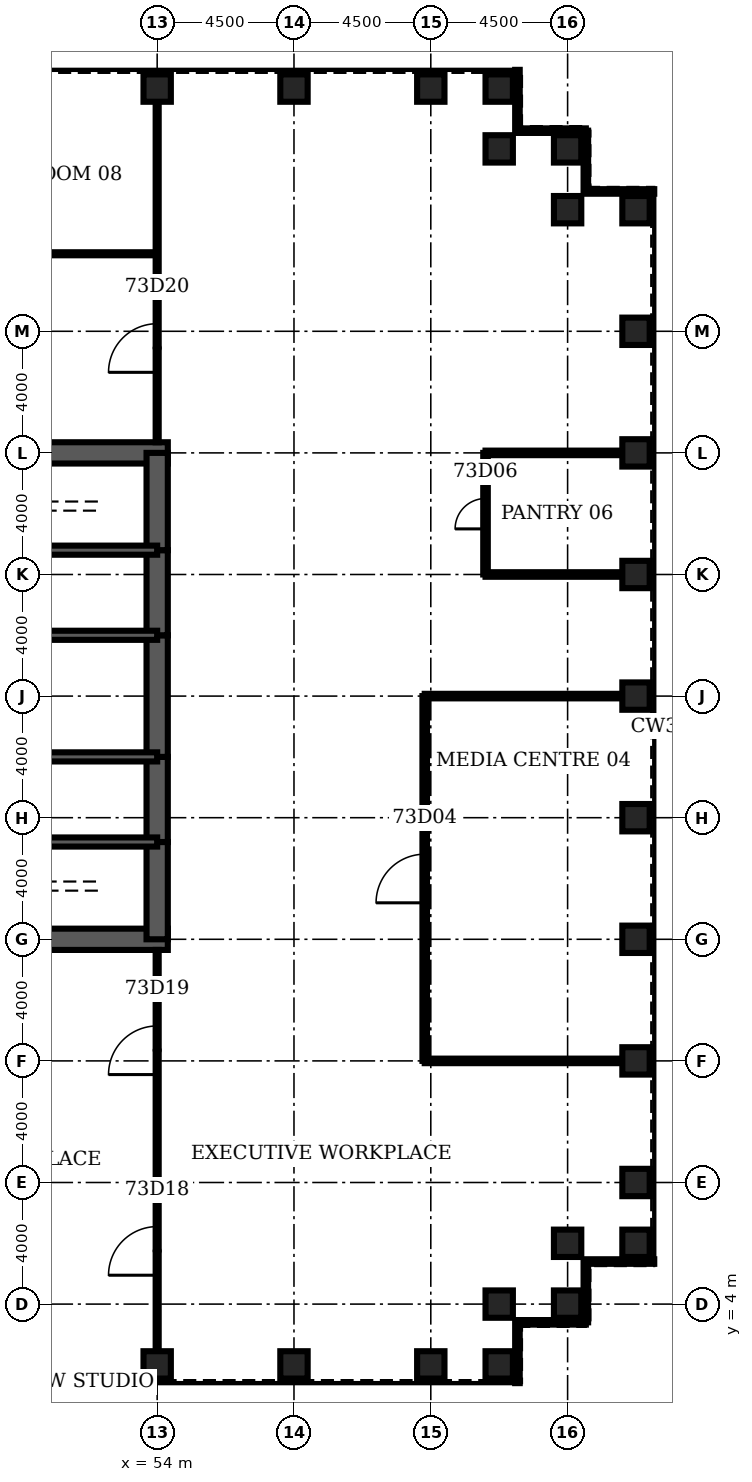
"""IFC4 building model, lengths in metres.
Left out: names, types, materials, properties, quantities, classifications, styles, units other than length and angle.
Written with IfcOpenShell. Run it as: python <this file> out.ifc"""

import sys

from ifc_helpers import new_model, si_unit, direction, frame, frame_2d, origin, origin_2d, place, context, subcontext, project, spatial, rectangle, hollow_rectangle, extrude, element, fill, save


model = new_model("IFC4")
c1 = context("Model", 3, precision=1e-05, world=origin(), true_north=direction((0.0, 1.0)))
c2 = subcontext(c1, "Body", "Model", "MODEL_VIEW")
j1 = project(units=[si_unit("LENGTHUNIT", "METRE"), si_unit("PLANEANGLEUNIT", "RADIAN")], contexts=[c1])
p1 = place(None, origin())
s1 = spatial("IfcSite", under=j1, at=p1, CompositionType="ELEMENT")
p2 = place(p1, origin())
s2 = spatial("IfcBuilding", under=s1, at=p2, CompositionType="ELEMENT")
p3 = place(p2, frame((0.0, 0.0, 321.5)))
s3 = spatial("IfcBuildingStorey", under=s2, at=p3, CompositionType="ELEMENT", Elevation=321.5)
for number, where, z_axis, x_axis in (
    (1, (54.0, 2.0, 0.0), (0.0, 0.0, 1.0), (0.0, 1.0, 0.0)),
    (2, (58.5, 2.0, 0.0), (0.0, 0.0, 1.0), (0.0, 1.0, 0.0)),
    (3, (63.0, 2.0, 0.0), (0.0, 0.0, 1.0), (0.0, 1.0, 0.0)),
    (4, (65.25, 2.0, 0.0), (0.0, 0.0, 1.0), (0.0, 1.0, 0.0)),
    (5, (65.25, 4.0, 0.0), (0.0, 0.0, 1.0), (0.0, 1.0, 0.0)),
    (6, (67.5, 4.0, 0.0), (0.0, 0.0, 1.0), (1.0, 0.0, 0.0)),
    (7, (67.5, 6.0, 0.0), (0.0, 0.0, 1.0), (1.0, 0.0, 0.0)),
    (8, (69.75, 6.0, 0.0), (0.0, 0.0, 1.0), (1.0, 0.0, 0.0)),
    (9, (69.75, 8.0, 0.0), (0.0, 0.0, 1.0), (1.0, 0.0, 0.0)),
    (10, (69.75, 12.0, 0.0), (0.0, 0.0, 1.0), (1.0, 0.0, 0.0)),
    (11, (69.75, 16.0, 0.0), (0.0, 0.0, 1.0), (1.0, 0.0, 0.0)),
    (12, (69.75, 20.0, 0.0), (0.0, 0.0, 1.0), (1.0, 0.0, 0.0)),
    (13, (69.75, 24.0, 0.0), (0.0, 0.0, 1.0), (1.0, 0.0, 0.0)),
    (14, (69.75, 28.0, 0.0), (0.0, 0.0, 1.0), (1.0, 0.0, 0.0)),
    (15, (69.75, 32.0, 0.0), (0.0, 0.0, 1.0), (1.0, 0.0, 0.0)),
    (16, (69.75, 36.0, 0.0), (0.0, 0.0, 1.0), (1.0, 0.0, 0.0)),
    (17, (69.75, 40.0, 0.0), (0.0, 0.0, 1.0), (1.0, 0.0, 0.0)),
    (18, (67.5, 40.0, 0.0), (0.0, 0.0, 1.0), (1.0, 0.0, 0.0)),
    (19, (67.5, 42.0, 0.0), (0.0, 0.0, 1.0), (1.0, 0.0, 0.0)),
    (20, (65.25, 42.0, 0.0), (0.0, 0.0, 1.0), (0.0, 1.0, 0.0)),
    (21, (65.25, 44.0, 0.0), (0.0, 0.0, 1.0), (0.0, 1.0, 0.0)),
    (22, (63.0, 44.0, 0.0), (0.0, 0.0, 1.0), (0.0, 1.0, 0.0)),
    (23, (58.5, 44.0, 0.0), (0.0, 0.0, 1.0), (0.0, 1.0, 0.0)),
    (24, (54.0, 44.0, 0.0), (0.0, 0.0, 1.0), (0.0, 1.0, 0.0)),
):
    element("IfcColumn", number, at=place(p3, frame(where, z_axis=z_axis, x_axis=x_axis)), inside=s3, PredefinedType="COLUMN", context=c2, shape_type="SweptSolid", body=[
        extrude(hollow_rectangle(XDim=0.9, YDim=0.9, WallThickness=0.05, at=origin_2d()), origin(), (0.0, 0.0, 1.0), 4.2),
    ])
for number, where, z_axis, x_axis in (
    (25, (45.0, 16.0, 0.0), (0.0, 0.0, 1.0), (1.0, 0.0, 0.0)),
    (26, (54.35, 32.0, 0.0), (0.0, 0.0, 1.0), (-1.0, 0.0, 0.0)),
):
    element("IfcWall", number, at=place(p3, frame(where, z_axis=z_axis, x_axis=x_axis)), inside=s3, PredefinedType="SHEAR", context=c2, shape_type="SweptSolid", body=[
        extrude(rectangle(XDim=9.35, YDim=0.7, at=frame_2d((4.675, 0.0))), origin(), (0.0, 0.0, 1.0), 4.2),
    ])
p4 = place(p3, frame((54.0, 16.0, 0.0), z_axis=(0.0, 0.0, 1.0), x_axis=(0.0, 1.0, 0.0)))
e27 = element("IfcWall", 27, at=p4, inside=s3, PredefinedType="SHEAR", context=c2, shape_type="SweptSolid", body=[
    extrude(rectangle(XDim=3.2, YDim=0.7, at=frame_2d((1.6, 0.0))), origin(), (0.0, 0.0, 1.0), 4.2),
])
p5 = place(p3, frame((54.0, 19.2, 0.0), z_axis=(0.0, 0.0, 1.0), x_axis=(0.0, 1.0, 0.0)))
e28 = element("IfcWall", 28, at=p5, inside=s3, PredefinedType="SHEAR", context=c2, shape_type="SweptSolid", body=[
    extrude(rectangle(XDim=2.8, YDim=0.7, at=frame_2d((1.4, 0.0))), origin(), (0.0, 0.0, 1.0), 4.2),
])
p6 = place(p5, frame((0.4, 0.0, 0.0)))
e29 = element("IfcOpeningElement", 29, at=p6, cuts=e28, PredefinedType="OPENING", context=c2, shape_type="SweptSolid", body=[
    extrude(rectangle(XDim=1.8, YDim=2.1, at=frame_2d((0.9, 1.05))), frame((0.0, 0.36, 0.0), z_axis=(0.0, -1.0, 0.0), x_axis=(1.0, 0.0, 0.0)), (0.0, 0.0, 1.0), 0.72),
])
p7 = place(p3, frame((54.0, 22.0, 0.0), z_axis=(0.0, 0.0, 1.0), x_axis=(0.0, 1.0, 0.0)))
e30 = element("IfcWall", 30, at=p7, inside=s3, PredefinedType="SHEAR", context=c2, shape_type="SweptSolid", body=[
    extrude(rectangle(XDim=4.0, YDim=0.7, at=frame_2d((2.0, 0.0))), origin(), (0.0, 0.0, 1.0), 4.2),
])
p8 = place(p3, frame((54.0, 26.0, 0.0), z_axis=(0.0, 0.0, 1.0), x_axis=(0.0, 1.0, 0.0)))
e31 = element("IfcWall", 31, at=p8, inside=s3, PredefinedType="SHEAR", context=c2, shape_type="SweptSolid", body=[
    extrude(rectangle(XDim=2.8, YDim=0.7, at=frame_2d((1.4, 0.0))), origin(), (0.0, 0.0, 1.0), 4.2),
])
p9 = place(p8, frame((0.6, 0.0, 0.0)))
e32 = element("IfcOpeningElement", 32, at=p9, cuts=e31, PredefinedType="OPENING", context=c2, shape_type="SweptSolid", body=[
    extrude(rectangle(XDim=1.8, YDim=2.1, at=frame_2d((0.9, 1.05))), frame((0.0, 0.36, 0.0), z_axis=(0.0, -1.0, 0.0), x_axis=(1.0, 0.0, 0.0)), (0.0, 0.0, 1.0), 0.72),
])
p10 = place(p3, frame((54.0, 28.8, 0.0), z_axis=(0.0, 0.0, 1.0), x_axis=(0.0, 1.0, 0.0)))
e33 = element("IfcWall", 33, at=p10, inside=s3, PredefinedType="SHEAR", context=c2, shape_type="SweptSolid", body=[
    extrude(rectangle(XDim=3.2, YDim=0.7, at=frame_2d((1.6, 0.0))), origin(), (0.0, 0.0, 1.0), 4.2),
])
p11 = place(p3, frame((45.0, 19.2, 0.0), z_axis=(0.0, 0.0, 1.0), x_axis=(1.0, 0.0, 0.0)))
e34 = element("IfcWall", 34, at=p11, inside=s3, PredefinedType="SOLIDWALL", context=c2, shape_type="SweptSolid", body=[
    extrude(rectangle(XDim=9.0, YDim=0.3, at=frame_2d((4.5, 0.0))), origin(), (0.0, 0.0, 1.0), 4.2),
])
p12 = place(p11, frame((7.35, 0.0, 0.0)))
e35 = element("IfcOpeningElement", 35, at=p12, cuts=e34, PredefinedType="OPENING", context=c2, shape_type="SweptSolid", body=[
    extrude(rectangle(XDim=1.0, YDim=2.1, at=frame_2d((0.5, 1.05))), frame((0.0, 0.16, 0.0), z_axis=(0.0, -1.0, 0.0), x_axis=(1.0, 0.0, 0.0)), (0.0, 0.0, 1.0), 0.32),
])
p13 = place(p3, frame((45.0, 28.8, 0.0), z_axis=(0.0, 0.0, 1.0), x_axis=(1.0, 0.0, 0.0)))
e36 = element("IfcWall", 36, at=p13, inside=s3, PredefinedType="SOLIDWALL", context=c2, shape_type="SweptSolid", body=[
    extrude(rectangle(XDim=9.0, YDim=0.3, at=frame_2d((4.5, 0.0))), origin(), (0.0, 0.0, 1.0), 4.2),
])
p14 = place(p13, frame((7.35, 0.0, 0.0)))
e37 = element("IfcOpeningElement", 37, at=p14, cuts=e36, PredefinedType="OPENING", context=c2, shape_type="SweptSolid", body=[
    extrude(rectangle(XDim=1.0, YDim=2.1, at=frame_2d((0.5, 1.05))), frame((0.0, 0.16, 0.0), z_axis=(0.0, -1.0, 0.0), x_axis=(1.0, 0.0, 0.0)), (0.0, 0.0, 1.0), 0.32),
])
p15 = place(p3, frame((48.0, 22.0, 0.0), z_axis=(0.0, 0.0, 1.0), x_axis=(1.0, 0.0, 0.0)))
e38 = element("IfcWall", 38, at=p15, inside=s3, PredefinedType="SOLIDWALL", context=c2, shape_type="SweptSolid", body=[
    extrude(rectangle(XDim=6.0, YDim=0.3, at=frame_2d((3.0, 0.0))), origin(), (0.0, 0.0, 1.0), 4.2),
])
p16 = place(p15, frame((2.0, 0.0, 0.0)))
e39 = element("IfcOpeningElement", 39, at=p16, cuts=e38, PredefinedType="OPENING", context=c2, shape_type="SweptSolid", body=[
    extrude(rectangle(XDim=1.0, YDim=2.1, at=frame_2d((0.5, 1.05))), frame((0.0, 0.16, 0.0), z_axis=(0.0, -1.0, 0.0), x_axis=(1.0, 0.0, 0.0)), (0.0, 0.0, 1.0), 0.32),
])
p17 = place(p15, frame((4.1, 0.0, 0.0)))
e40 = element("IfcOpeningElement", 40, at=p17, cuts=e38, PredefinedType="OPENING", context=c2, shape_type="SweptSolid", body=[
    extrude(rectangle(XDim=1.0, YDim=2.1, at=frame_2d((0.5, 1.05))), frame((0.0, 0.16, 0.0), z_axis=(0.0, -1.0, 0.0), x_axis=(1.0, 0.0, 0.0)), (0.0, 0.0, 1.0), 0.32),
])
p18 = place(p3, frame((48.0, 26.0, 0.0), z_axis=(0.0, 0.0, 1.0), x_axis=(1.0, 0.0, 0.0)))
e41 = element("IfcWall", 41, at=p18, inside=s3, PredefinedType="SOLIDWALL", context=c2, shape_type="SweptSolid", body=[
    extrude(rectangle(XDim=6.0, YDim=0.3, at=frame_2d((3.0, 0.0))), origin(), (0.0, 0.0, 1.0), 4.2),
])
p19 = place(p3, frame((51.475, 22.15, 0.0), z_axis=(0.0, 0.0, 1.0), x_axis=(0.0, 1.0, 0.0)))
e42 = element("IfcWall", 42, at=p19, inside=s3, PredefinedType="PARTITIONING", context=c2, shape_type="SweptSolid", body=[
    extrude(rectangle(XDim=3.7, YDim=0.15, at=frame_2d((1.85, 0.0))), origin(), (0.0, 0.0, 1.0), 3.0),
])
for number, where, z_axis, x_axis in (
    (43, (62.8, 12.0, 0.0), (0.0, 0.0, 1.0), (1.0, 0.0, 0.0)),
    (44, (62.8, 24.0, 0.0), (0.0, 0.0, 1.0), (1.0, 0.0, 0.0)),
):
    element("IfcWall", number, at=place(p3, frame(where, z_axis=z_axis, x_axis=x_axis)), inside=s3, PredefinedType="PARTITIONING", context=c2, shape_type="SweptSolid", body=[
        extrude(rectangle(XDim=6.5, YDim=0.15, at=frame_2d((3.25, 0.0))), origin(), (0.0, 0.0, 1.0), 3.0),
    ])
for number, where, z_axis, x_axis in (
    (45, (64.8, 28.0, 0.0), (0.0, 0.0, 1.0), (1.0, 0.0, 0.0)),
    (46, (64.8, 32.0, 0.0), (0.0, 0.0, 1.0), (1.0, 0.0, 0.0)),
):
    element("IfcWall", number, at=place(p3, frame(where, z_axis=z_axis, x_axis=x_axis)), inside=s3, PredefinedType="PARTITIONING", context=c2, shape_type="SweptSolid", body=[
        extrude(rectangle(XDim=4.5, YDim=0.15, at=frame_2d((2.25, 0.0))), origin(), (0.0, 0.0, 1.0), 3.0),
    ])
p20 = place(p3, frame((36.0, 38.55, 0.0), z_axis=(0.0, 0.0, 1.0), x_axis=(1.0, 0.0, 0.0)))
e47 = element("IfcWall", 47, at=p20, inside=s3, PredefinedType="PARTITIONING", context=c2, shape_type="SweptSolid", body=[
    extrude(rectangle(XDim=18.0, YDim=0.1, at=frame_2d((9.0, 0.0))), origin(), (0.0, 0.0, 1.0), 3.0),
])
p21 = place(p20, frame((4.0, 0.0, 0.0)))
e48 = element("IfcOpeningElement", 48, at=p21, cuts=e47, PredefinedType="OPENING", context=c2, shape_type="SweptSolid", body=[
    extrude(rectangle(XDim=1.0, YDim=2.1, at=frame_2d((0.5, 1.05))), frame((0.0, 0.06, 0.0), z_axis=(0.0, -1.0, 0.0), x_axis=(1.0, 0.0, 0.0)), (0.0, 0.0, 1.0), 0.12),
])
p22 = place(p20, frame((13.0, 0.0, 0.0)))
e49 = element("IfcOpeningElement", 49, at=p22, cuts=e47, PredefinedType="OPENING", context=c2, shape_type="SweptSolid", body=[
    extrude(rectangle(XDim=1.0, YDim=2.1, at=frame_2d((0.5, 1.05))), frame((0.0, 0.06, 0.0), z_axis=(0.0, -1.0, 0.0), x_axis=(1.0, 0.0, 0.0)), (0.0, 0.0, 1.0), 0.12),
])
p23 = place(p3, frame((54.0, 2.45, 0.0), z_axis=(0.0, 0.0, 1.0), x_axis=(0.0, 1.0, 0.0)))
e50 = element("IfcWall", 50, at=p23, inside=s3, PredefinedType="PARTITIONING", context=c2, shape_type="SweptSolid", body=[
    extrude(rectangle(XDim=13.2, YDim=0.1, at=frame_2d((6.6, 0.0))), origin(), (0.0, 0.0, 1.0), 3.0),
])
p24 = place(p23, frame((2.5, 0.0, 0.0)))
e51 = element("IfcOpeningElement", 51, at=p24, cuts=e50, PredefinedType="OPENING", context=c2, shape_type="SweptSolid", body=[
    extrude(rectangle(XDim=1.6, YDim=2.1, at=frame_2d((0.8, 1.05))), frame((0.0, 0.06, 0.0), z_axis=(0.0, -1.0, 0.0), x_axis=(1.0, 0.0, 0.0)), (0.0, 0.0, 1.0), 0.12),
])
p25 = place(p23, frame((9.1, 0.0, 0.0)))
e52 = element("IfcOpeningElement", 52, at=p25, cuts=e50, PredefinedType="OPENING", context=c2, shape_type="SweptSolid", body=[
    extrude(rectangle(XDim=1.6, YDim=2.1, at=frame_2d((0.8, 1.05))), frame((0.0, 0.06, 0.0), z_axis=(0.0, -1.0, 0.0), x_axis=(1.0, 0.0, 0.0)), (0.0, 0.0, 1.0), 0.12),
])
p26 = place(p3, frame((54.0, 32.35, 0.0), z_axis=(0.0, 0.0, 1.0), x_axis=(0.0, 1.0, 0.0)))
e53 = element("IfcWall", 53, at=p26, inside=s3, PredefinedType="PARTITIONING", context=c2, shape_type="SweptSolid", body=[
    extrude(rectangle(XDim=11.2, YDim=0.1, at=frame_2d((5.6, 0.0))), origin(), (0.0, 0.0, 1.0), 3.0),
])
p27 = place(p26, frame((2.3, 0.0, 0.0)))
e54 = element("IfcOpeningElement", 54, at=p27, cuts=e53, PredefinedType="OPENING", context=c2, shape_type="SweptSolid", body=[
    extrude(rectangle(XDim=1.6, YDim=2.1, at=frame_2d((0.8, 1.05))), frame((0.0, 0.06, 0.0), z_axis=(0.0, -1.0, 0.0), x_axis=(1.0, 0.0, 0.0)), (0.0, 0.0, 1.0), 0.12),
])
p28 = place(p3, frame((62.8, 12.0, 0.0), z_axis=(0.0, 0.0, 1.0), x_axis=(0.0, 1.0, 0.0)))
e55 = element("IfcWall", 55, at=p28, inside=s3, PredefinedType="PARTITIONING", context=c2, shape_type="SweptSolid", body=[
    extrude(rectangle(XDim=12.0, YDim=0.15, at=frame_2d((6.0, 0.0))), origin(), (0.0, 0.0, 1.0), 3.0),
])
p29 = place(p28, frame((5.2, 0.0, 0.0)))
e56 = element("IfcOpeningElement", 56, at=p29, cuts=e55, PredefinedType="OPENING", context=c2, shape_type="SweptSolid", body=[
    extrude(rectangle(XDim=1.6, YDim=2.1, at=frame_2d((0.8, 1.05))), frame((0.0, 0.085, 0.0), z_axis=(0.0, -1.0, 0.0), x_axis=(1.0, 0.0, 0.0)), (0.0, 0.0, 1.0), 0.17),
])
p30 = place(p3, frame((64.8, 28.0, 0.0), z_axis=(0.0, 0.0, 1.0), x_axis=(0.0, 1.0, 0.0)))
e57 = element("IfcWall", 57, at=p30, inside=s3, PredefinedType="PARTITIONING", context=c2, shape_type="SweptSolid", body=[
    extrude(rectangle(XDim=4.0, YDim=0.15, at=frame_2d((2.0, 0.0))), origin(), (0.0, 0.0, 1.0), 3.0),
])
p31 = place(p30, frame((1.5, 0.0, 0.0)))
e58 = element("IfcOpeningElement", 58, at=p31, cuts=e57, PredefinedType="OPENING", context=c2, shape_type="SweptSolid", body=[
    extrude(rectangle(XDim=1.0, YDim=2.1, at=frame_2d((0.5, 1.05))), frame((0.0, 0.085, 0.0), z_axis=(0.0, -1.0, 0.0), x_axis=(1.0, 0.0, 0.0)), (0.0, 0.0, 1.0), 0.17),
])
p32 = place(p3, frame((65.85, 1.4, 0.0), z_axis=(0.0, 0.0, 1.0), x_axis=(0.0, 1.0, 0.0)))
e59 = element("IfcWall", 59, at=p32, inside=s3, PredefinedType="ELEMENTEDWALL", context=c2, shape_type="SweptSolid", body=[
    extrude(rectangle(XDim=2.0, YDim=0.15, at=frame_2d((1.0, 0.0))), origin(), (0.0, 0.0, 1.0), 4.04),
])
p33 = place(p3, frame((65.85, 3.4, 0.0), z_axis=(0.0, 0.0, 1.0), x_axis=(1.0, 0.0, 0.0)))
e60 = element("IfcWall", 60, at=p33, inside=s3, PredefinedType="ELEMENTEDWALL", context=c2, shape_type="SweptSolid", body=[
    extrude(rectangle(XDim=2.25, YDim=0.15, at=frame_2d((1.125, 0.0))), origin(), (0.0, 0.0, 1.0), 4.04),
])
p34 = place(p3, frame((68.1, 3.4, 0.0), z_axis=(0.0, 0.0, 1.0), x_axis=(0.0, 1.0, 0.0)))
e61 = element("IfcWall", 61, at=p34, inside=s3, PredefinedType="ELEMENTEDWALL", context=c2, shape_type="SweptSolid", body=[
    extrude(rectangle(XDim=2.0, YDim=0.15, at=frame_2d((1.0, 0.0))), origin(), (0.0, 0.0, 1.0), 4.04),
])
for number, where, z_axis, x_axis in (
    (62, (68.1, 5.4, 0.0), (0.0, 0.0, 1.0), (1.0, 0.0, 0.0)),
    (63, (70.35, 40.6, 0.0), (0.0, 0.0, 1.0), (-1.0, 0.0, 0.0)),
):
    element("IfcWall", number, at=place(p3, frame(where, z_axis=z_axis, x_axis=x_axis)), inside=s3, PredefinedType="ELEMENTEDWALL", context=c2, shape_type="SweptSolid", body=[
        extrude(rectangle(XDim=2.25, YDim=0.15, at=frame_2d((1.125, 0.0))), origin(), (0.0, 0.0, 1.0), 4.04),
    ])
p35 = place(p3, frame((68.1, 40.6, 0.0), z_axis=(0.0, 0.0, 1.0), x_axis=(0.0, 1.0, 0.0)))
e64 = element("IfcWall", 64, at=p35, inside=s3, PredefinedType="ELEMENTEDWALL", context=c2, shape_type="SweptSolid", body=[
    extrude(rectangle(XDim=2.0, YDim=0.15, at=frame_2d((1.0, 0.0))), origin(), (0.0, 0.0, 1.0), 4.04),
])
p36 = place(p3, frame((68.1, 42.6, 0.0), z_axis=(0.0, 0.0, 1.0), x_axis=(-1.0, 0.0, 0.0)))
e65 = element("IfcWall", 65, at=p36, inside=s3, PredefinedType="ELEMENTEDWALL", context=c2, shape_type="SweptSolid", body=[
    extrude(rectangle(XDim=2.25, YDim=0.15, at=frame_2d((1.125, 0.0))), origin(), (0.0, 0.0, 1.0), 4.04),
])
p37 = place(p3, frame((65.85, 42.6, 0.0), z_axis=(0.0, 0.0, 1.0), x_axis=(0.0, 1.0, 0.0)))
e66 = element("IfcWall", 66, at=p37, inside=s3, PredefinedType="ELEMENTEDWALL", context=c2, shape_type="SweptSolid", body=[
    extrude(rectangle(XDim=2.0, YDim=0.15, at=frame_2d((1.0, 0.0))), origin(), (0.0, 0.0, 1.0), 4.04),
])
p38 = place(p29, origin())
e67 = element("IfcDoor", 67, at=p38, inside=s3, OperationType="SINGLE_SWING_LEFT", PredefinedType="DOOR", context=c2, shape_type="SweptSolid", body=[
    extrude(rectangle(XDim=1.6, YDim=2.1, at=frame_2d((0.8, 1.05))), frame((0.0, 0.025, 0.0), z_axis=(0.0, -1.0, 0.0), x_axis=(1.0, 0.0, 0.0)), (0.0, 0.0, 1.0), 0.05),
])
fill(e56, e67)
p39 = place(p31, origin())
e68 = element("IfcDoor", 68, at=p39, inside=s3, OperationType="SINGLE_SWING_LEFT", PredefinedType="DOOR", context=c2, shape_type="SweptSolid", body=[
    extrude(rectangle(XDim=1.0, YDim=2.1, at=frame_2d((0.5, 1.05))), frame((0.0, 0.025, 0.0), z_axis=(0.0, -1.0, 0.0), x_axis=(1.0, 0.0, 0.0)), (0.0, 0.0, 1.0), 0.05),
])
fill(e58, e68)
p40 = place(p24, origin())
e69 = element("IfcDoor", 69, at=p40, inside=s3, OperationType="SINGLE_SWING_LEFT", PredefinedType="DOOR", context=c2, shape_type="SweptSolid", body=[
    extrude(rectangle(XDim=1.6, YDim=2.1, at=frame_2d((0.8, 1.05))), frame((0.0, 0.025, 0.0), z_axis=(0.0, -1.0, 0.0), x_axis=(1.0, 0.0, 0.0)), (0.0, 0.0, 1.0), 0.05),
])
fill(e51, e69)
p41 = place(p25, origin())
e70 = element("IfcDoor", 70, at=p41, inside=s3, OperationType="SINGLE_SWING_LEFT", PredefinedType="DOOR", context=c2, shape_type="SweptSolid", body=[
    extrude(rectangle(XDim=1.6, YDim=2.1, at=frame_2d((0.8, 1.05))), frame((0.0, 0.025, 0.0), z_axis=(0.0, -1.0, 0.0), x_axis=(1.0, 0.0, 0.0)), (0.0, 0.0, 1.0), 0.05),
])
fill(e52, e70)
p42 = place(p27, origin())
e71 = element("IfcDoor", 71, at=p42, inside=s3, OperationType="SINGLE_SWING_LEFT", PredefinedType="DOOR", context=c2, shape_type="SweptSolid", body=[
    extrude(rectangle(XDim=1.6, YDim=2.1, at=frame_2d((0.8, 1.05))), frame((0.0, 0.025, 0.0), z_axis=(0.0, -1.0, 0.0), x_axis=(1.0, 0.0, 0.0)), (0.0, 0.0, 1.0), 0.05),
])
fill(e54, e71)
p43 = place(p12, origin())
e72 = element("IfcDoor", 72, at=p43, inside=s3, OperationType="SINGLE_SWING_RIGHT", PredefinedType="DOOR", context=c2, shape_type="SweptSolid", body=[
    extrude(rectangle(XDim=1.0, YDim=2.1, at=frame_2d((0.5, 1.05))), frame((0.0, 0.025, 0.0), z_axis=(0.0, -1.0, 0.0), x_axis=(1.0, 0.0, 0.0)), (0.0, 0.0, 1.0), 0.05),
])
fill(e35, e72)
p44 = place(p14, origin())
e73 = element("IfcDoor", 73, at=p44, inside=s3, OperationType="SINGLE_SWING_RIGHT", PredefinedType="DOOR", context=c2, shape_type="SweptSolid", body=[
    extrude(rectangle(XDim=1.0, YDim=2.1, at=frame_2d((0.5, 1.05))), frame((0.0, 0.025, 0.0), z_axis=(0.0, -1.0, 0.0), x_axis=(1.0, 0.0, 0.0)), (0.0, 0.0, 1.0), 0.05),
])
fill(e37, e73)
p45 = place(p6, origin())
e74 = element("IfcDoor", 74, at=p45, inside=s3, OperationType="SINGLE_SWING_LEFT", PredefinedType="DOOR", context=c2, shape_type="SweptSolid", body=[
    extrude(rectangle(XDim=1.8, YDim=2.1, at=frame_2d((0.9, 1.05))), frame((0.0, 0.35, 0.0), z_axis=(0.0, -1.0, 0.0), x_axis=(1.0, 0.0, 0.0)), (0.0, 0.0, 1.0), 0.699),
])
fill(e29, e74)
p46 = place(p9, origin())
e75 = element("IfcDoor", 75, at=p46, inside=s3, OperationType="SINGLE_SWING_LEFT", PredefinedType="DOOR", context=c2, shape_type="SweptSolid", body=[
    extrude(rectangle(XDim=1.8, YDim=2.1, at=frame_2d((0.9, 1.05))), frame((0.0, 0.35, 0.0), z_axis=(0.0, -1.0, 0.0), x_axis=(1.0, 0.0, 0.0)), (0.0, 0.0, 1.0), 0.699),
])
fill(e32, e75)
p47 = place(p16, origin())
e76 = element("IfcDoor", 76, at=p47, inside=s3, OperationType="SINGLE_SWING_LEFT", PredefinedType="DOOR", context=c2, shape_type="SweptSolid", body=[
    extrude(rectangle(XDim=1.0, YDim=2.1, at=frame_2d((0.5, 1.05))), frame((0.0, 0.025, 0.0), z_axis=(0.0, -1.0, 0.0), x_axis=(1.0, 0.0, 0.0)), (0.0, 0.0, 1.0), 0.05),
])
fill(e39, e76)
p48 = place(p17, origin())
e77 = element("IfcDoor", 77, at=p48, inside=s3, OperationType="SINGLE_SWING_RIGHT", PredefinedType="DOOR", context=c2, shape_type="SweptSolid", body=[
    extrude(rectangle(XDim=1.0, YDim=2.1, at=frame_2d((0.5, 1.05))), frame((0.0, 0.025, 0.0), z_axis=(0.0, -1.0, 0.0), x_axis=(1.0, 0.0, 0.0)), (0.0, 0.0, 1.0), 0.05),
])
fill(e40, e77)
save(model, sys.argv[1])
